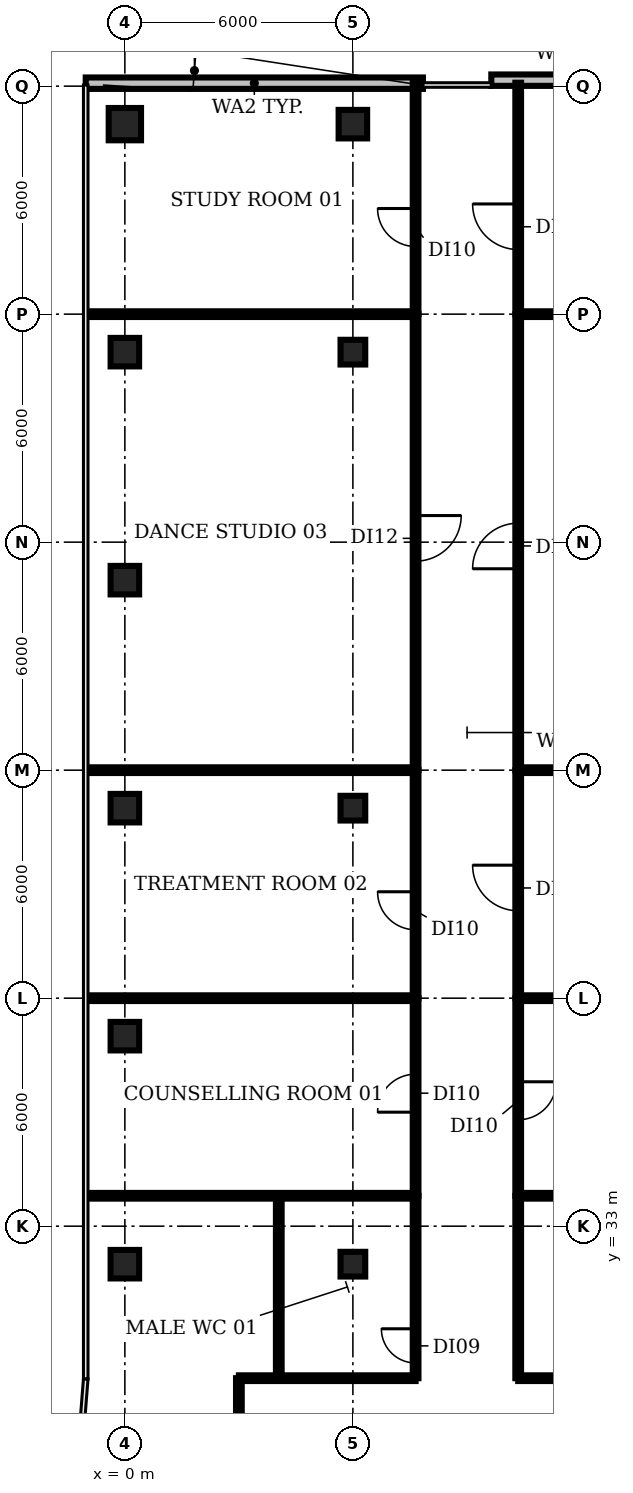
"""IFC4 building model, lengths in metres.
Left out: names, types, materials, properties, quantities, classifications, styles, units other than length and angle.
Written with IfcOpenShell. Run it as: python <this file> out.ifc"""

import sys

from ifc_helpers import new_model, si_unit, direction, frame, frame_2d, origin, origin_2d, place, context, subcontext, project, spatial, rectangle, circle, extrude, element, fill, save


model = new_model("IFC4")
c1 = context("Model", 3, precision=1e-05, world=origin(), true_north=direction((0.0, 1.0)))
c2 = subcontext(c1, "Body", "Model", "MODEL_VIEW")
j1 = project(units=[si_unit("LENGTHUNIT", "METRE"), si_unit("PLANEANGLEUNIT", "RADIAN")], contexts=[c1])
p1 = place(None, origin())
s1 = spatial("IfcSite", under=j1, at=p1, CompositionType="ELEMENT")
p2 = place(p1, origin())
s2 = spatial("IfcBuilding", under=s1, at=p2, CompositionType="ELEMENT")
p3 = place(p2, frame((0.0, 0.0, 268.4)))
s3 = spatial("IfcBuildingStorey", under=s2, at=p3, CompositionType="ELEMENT", Elevation=268.4)
for number, where, z_axis, x_axis in (
    (1, (0.0, 32.0, 0.0), (0.0, 0.0, 1.0), (1.0, 0.0, 0.0)),
    (2, (0.0, 38.0, 0.0), (0.0, 0.0, 1.0), (1.0, 0.0, 0.0)),
    (3, (0.0, 44.0, 0.0), (0.0, 0.0, 1.0), (1.0, 0.0, 0.0)),
    (4, (0.0, 50.0, 0.0), (0.0, 0.0, 1.0), (1.0, 0.0, 0.0)),
    (5, (0.0, 56.0, 0.0), (0.0, 0.0, 1.0), (1.0, 0.0, 0.0)),
):
    element("IfcColumn", number, at=place(p3, frame(where, z_axis=z_axis, x_axis=x_axis)), inside=s3, PredefinedType="COLUMN", context=c2, shape_type="SweptSolid", body=[
        extrude(rectangle(XDim=0.75, YDim=0.75, at=origin_2d()), origin(), (0.0, 0.0, 1.0), 3.8),
    ])
p4 = place(p3, frame((0.0, 62.0, 0.0), z_axis=(0.0, 0.0, 1.0), x_axis=(1.0, 0.0, 0.0)))
e6 = element("IfcColumn", 6, at=p4, inside=s3, PredefinedType="COLUMN", context=c2, shape_type="SweptSolid", body=[
    extrude(circle(Radius=0.425, at=origin_2d()), origin(), (0.0, 0.0, 1.0), 3.8),
])
for number, where, z_axis, x_axis in (
    (7, (6.0, 32.0, 0.0), (0.0, 0.0, 1.0), (1.0, 0.0, 0.0)),
    (8, (6.0, 44.0, 0.0), (0.0, 0.0, 1.0), (1.0, 0.0, 0.0)),
    (9, (6.0, 56.0, 0.0), (0.0, 0.0, 1.0), (1.0, 0.0, 0.0)),
):
    element("IfcColumn", number, at=place(p3, frame(where, z_axis=z_axis, x_axis=x_axis)), inside=s3, PredefinedType="COLUMN", context=c2, shape_type="SweptSolid", body=[
        extrude(rectangle(XDim=0.65, YDim=0.65, at=origin_2d()), origin(), (0.0, 0.0, 1.0), 3.8),
    ])
p5 = place(p3, frame((6.0, 62.0, 0.0), z_axis=(0.0, 0.0, 1.0), x_axis=(1.0, 0.0, 0.0)))
e10 = element("IfcColumn", 10, at=p5, inside=s3, PredefinedType="COLUMN", context=c2, shape_type="SweptSolid", body=[
    extrude(rectangle(XDim=0.75, YDim=0.75, at=origin_2d()), origin(), (0.0, 0.0, 1.0), 3.8),
])
p6 = place(p3, frame((14.357, 63.157, 0.0), z_axis=(0.0, 0.0, 1.0), x_axis=(-1.0, 0.0, 0.0)))
e11 = element("IfcWall", 11, at=p6, inside=s3, PredefinedType="SOLIDWALL", context=c2, shape_type="SweptSolid", body=[
    extrude(rectangle(XDim=4.715, YDim=0.3, at=frame_2d((2.357, 0.0))), origin(), (0.0, 0.0, 1.0), 3.8),
])
p7 = place(p3, frame((7.843, 63.078, 0.0), z_axis=(0.0, 0.0, 1.0), x_axis=(-1.0, 0.0, 0.0)))
e12 = element("IfcWall", 12, at=p7, inside=s3, PredefinedType="SOLIDWALL", context=c2, shape_type="SweptSolid", body=[
    extrude(rectangle(XDim=8.873, YDim=0.3, at=frame_2d((4.436, 0.0))), origin(), (0.0, 0.0, 1.0), 3.8),
])
for number, where, z_axis, x_axis in (
    (13, (-0.98, 33.8, 0.0), (0.0, 0.0, 1.0), (1.0, 0.0, 0.0)),
    (14, (-0.98, 39.0, 0.0), (0.0, 0.0, 1.0), (1.0, 0.0, 0.0)),
    (15, (-0.98, 45.0, 0.0), (0.0, 0.0, 1.0), (1.0, 0.0, 0.0)),
    (16, (-0.98, 57.0, 0.0), (0.0, 0.0, 1.0), (1.0, 0.0, 0.0)),
):
    element("IfcWall", number, at=place(p3, frame(where, z_axis=z_axis, x_axis=x_axis)), inside=s3, PredefinedType="PARTITIONING", context=c2, shape_type="SweptSolid", body=[
        extrude(rectangle(XDim=8.63, YDim=0.15, at=frame_2d((4.315, 0.0))), origin(), (0.0, 0.0, 1.0), 2.85),
    ])
p8 = place(p3, frame((3.0, 25.1, 0.0), z_axis=(0.0, 0.0, 1.0), x_axis=(0.0, 1.0, 0.0)))
e17 = element("IfcWall", 17, at=p8, inside=s3, PredefinedType="PARTITIONING", context=c2, shape_type="SweptSolid", body=[
    extrude(rectangle(XDim=3.9, YDim=0.15, at=frame_2d((1.95, 0.0))), origin(), (0.0, 0.0, 1.0), 2.85),
])
p9 = place(p3, frame((3.0, 29.0, 0.0), z_axis=(0.0, 0.0, 1.0), x_axis=(1.0, 0.0, 0.0)))
e18 = element("IfcWall", 18, at=p9, inside=s3, PredefinedType="PARTITIONING", context=c2, shape_type="SweptSolid", body=[
    extrude(rectangle(XDim=4.65, YDim=0.15, at=frame_2d((2.325, 0.0))), origin(), (0.0, 0.0, 1.0), 2.85),
])
p10 = place(p3, frame((4.05, 29.0, 0.0), z_axis=(0.0, 0.0, 1.0), x_axis=(0.0, 1.0, 0.0)))
e19 = element("IfcWall", 19, at=p10, inside=s3, PredefinedType="PARTITIONING", context=c2, shape_type="SweptSolid", body=[
    extrude(rectangle(XDim=4.8, YDim=0.15, at=frame_2d((2.4, 0.0))), origin(), (0.0, 0.0, 1.0), 2.85),
])
p11 = place(p3, frame((7.65, 29.0, 0.0), z_axis=(0.0, 0.0, 1.0), x_axis=(0.0, 1.0, 0.0)))
e20 = element("IfcWall", 20, at=p11, inside=s3, PredefinedType="PARTITIONING", context=c2, shape_type="SweptSolid", body=[
    extrude(rectangle(XDim=4.8, YDim=0.15, at=frame_2d((2.4, 0.0))), origin(), (0.0, 0.0, 1.0), 2.85),
])
p12 = place(p11, frame((0.4, 0.0, 0.0)))
e21 = element("IfcOpeningElement", 21, at=p12, cuts=e20, PredefinedType="OPENING", context=c2, shape_type="SweptSolid", body=[
    extrude(rectangle(XDim=0.9, YDim=2.1, at=frame_2d((0.45, 1.05))), frame((0.0, 0.085, 0.0), z_axis=(0.0, -1.0, 0.0), x_axis=(1.0, 0.0, 0.0)), (0.0, 0.0, 1.0), 0.17),
])
p13 = place(p3, frame((7.65, 33.8, 0.0), z_axis=(0.0, 0.0, 1.0), x_axis=(0.0, 1.0, 0.0)))
e22 = element("IfcWall", 22, at=p13, inside=s3, PredefinedType="PARTITIONING", context=c2, shape_type="SweptSolid", body=[
    extrude(rectangle(XDim=5.2, YDim=0.15, at=frame_2d((2.6, 0.0))), origin(), (0.0, 0.0, 1.0), 2.85),
])
p14 = place(p13, frame((2.2, 0.0, 0.0)))
e23 = element("IfcOpeningElement", 23, at=p14, cuts=e22, PredefinedType="OPENING", context=c2, shape_type="SweptSolid", body=[
    extrude(rectangle(XDim=1.0, YDim=2.1, at=frame_2d((0.5, 1.05))), frame((0.0, 0.085, 0.0), z_axis=(0.0, -1.0, 0.0), x_axis=(1.0, 0.0, 0.0)), (0.0, 0.0, 1.0), 0.17),
])
p15 = place(p3, frame((7.65, 39.0, 0.0), z_axis=(0.0, 0.0, 1.0), x_axis=(0.0, 1.0, 0.0)))
e24 = element("IfcWall", 24, at=p15, inside=s3, PredefinedType="PARTITIONING", context=c2, shape_type="SweptSolid", body=[
    extrude(rectangle(XDim=6.0, YDim=0.15, at=frame_2d((3.0, 0.0))), origin(), (0.0, 0.0, 1.0), 2.85),
])
p16 = place(p15, frame((1.8, 0.0, 0.0)))
e25 = element("IfcOpeningElement", 25, at=p16, cuts=e24, PredefinedType="OPENING", context=c2, shape_type="SweptSolid", body=[
    extrude(rectangle(XDim=1.0, YDim=2.1, at=frame_2d((0.5, 1.05))), frame((0.0, 0.085, 0.0), z_axis=(0.0, -1.0, 0.0), x_axis=(1.0, 0.0, 0.0)), (0.0, 0.0, 1.0), 0.17),
])
p17 = place(p3, frame((7.65, 57.0, 0.0), z_axis=(0.0, 0.0, 1.0), x_axis=(0.0, -1.0, 0.0)))
e26 = element("IfcWall", 26, at=p17, inside=s3, PredefinedType="PARTITIONING", context=c2, shape_type="SweptSolid", body=[
    extrude(rectangle(XDim=12.0, YDim=0.15, at=frame_2d((6.0, 0.0))), origin(), (0.0, 0.0, 1.0), 2.85),
])
p18 = place(p17, frame((5.3, 0.0, 0.0)))
e27 = element("IfcOpeningElement", 27, at=p18, cuts=e26, PredefinedType="OPENING", context=c2, shape_type="SweptSolid", body=[
    extrude(rectangle(XDim=1.2, YDim=2.1, at=frame_2d((0.6, 1.05))), frame((0.0, 0.085, 0.0), z_axis=(0.0, -1.0, 0.0), x_axis=(1.0, 0.0, 0.0)), (0.0, 0.0, 1.0), 0.17),
])
p19 = place(p3, frame((7.65, 57.0, 0.0), z_axis=(0.0, 0.0, 1.0), x_axis=(0.0, 1.0, 0.0)))
e28 = element("IfcWall", 28, at=p19, inside=s3, PredefinedType="PARTITIONING", context=c2, shape_type="SweptSolid", body=[
    extrude(rectangle(XDim=6.09, YDim=0.15, at=frame_2d((3.045, 0.0))), origin(), (0.0, 0.0, 1.0), 2.85),
])
p20 = place(p19, frame((1.78, 0.0, 0.0)))
e29 = element("IfcOpeningElement", 29, at=p20, cuts=e28, PredefinedType="OPENING", context=c2, shape_type="SweptSolid", body=[
    extrude(rectangle(XDim=1.0, YDim=2.1, at=frame_2d((0.5, 1.05))), frame((0.0, 0.085, 0.0), z_axis=(0.0, -1.0, 0.0), x_axis=(1.0, 0.0, 0.0)), (0.0, 0.0, 1.0), 0.17),
])
p21 = place(p3, frame((10.35, 29.0, 0.0), z_axis=(0.0, 0.0, 1.0), x_axis=(0.0, 1.0, 0.0)))
e30 = element("IfcWall", 30, at=p21, inside=s3, PredefinedType="PARTITIONING", context=c2, shape_type="SweptSolid", body=[
    extrude(rectangle(XDim=4.8, YDim=0.15, at=frame_2d((2.4, 0.0))), origin(), (0.0, 0.0, 1.0), 2.85),
])
p22 = place(p3, frame((10.35, 29.0, 0.0), z_axis=(0.0, 0.0, 1.0), x_axis=(1.0, 0.0, 0.0)))
e31 = element("IfcWall", 31, at=p22, inside=s3, PredefinedType="PARTITIONING", context=c2, shape_type="SweptSolid", body=[
    extrude(rectangle(XDim=4.05, YDim=0.15, at=frame_2d((2.025, 0.0))), origin(), (0.0, 0.0, 1.0), 2.85),
])
p23 = place(p3, frame((10.35, 33.8, 0.0), z_axis=(0.0, 0.0, 1.0), x_axis=(1.0, 0.0, 0.0)))
e32 = element("IfcWall", 32, at=p23, inside=s3, PredefinedType="PARTITIONING", context=c2, shape_type="SweptSolid", body=[
    extrude(rectangle(XDim=11.49, YDim=0.15, at=frame_2d((5.745, 0.0))), origin(), (0.0, 0.0, 1.0), 2.85),
])
p24 = place(p3, frame((10.35, 39.0, 0.0), z_axis=(0.0, 0.0, 1.0), x_axis=(0.0, -1.0, 0.0)))
e33 = element("IfcWall", 33, at=p24, inside=s3, PredefinedType="PARTITIONING", context=c2, shape_type="SweptSolid", body=[
    extrude(rectangle(XDim=5.2, YDim=0.15, at=frame_2d((2.6, 0.0))), origin(), (0.0, 0.0, 1.0), 2.85),
])
p25 = place(p24, frame((2.2, 0.0, 0.0)))
e34 = element("IfcOpeningElement", 34, at=p25, cuts=e33, PredefinedType="OPENING", context=c2, shape_type="SweptSolid", body=[
    extrude(rectangle(XDim=1.0, YDim=2.1, at=frame_2d((0.5, 1.05))), frame((0.0, 0.085, 0.0), z_axis=(0.0, -1.0, 0.0), x_axis=(1.0, 0.0, 0.0)), (0.0, 0.0, 1.0), 0.17),
])
p26 = place(p3, frame((10.35, 39.0, 0.0), z_axis=(0.0, 0.0, 1.0), x_axis=(0.0, 1.0, 0.0)))
e35 = element("IfcWall", 35, at=p26, inside=s3, PredefinedType="PARTITIONING", context=c2, shape_type="SweptSolid", body=[
    extrude(rectangle(XDim=6.0, YDim=0.15, at=frame_2d((3.0, 0.0))), origin(), (0.0, 0.0, 1.0), 2.85),
])
p27 = place(p26, frame((2.3, 0.0, 0.0)))
e36 = element("IfcOpeningElement", 36, at=p27, cuts=e35, PredefinedType="OPENING", context=c2, shape_type="SweptSolid", body=[
    extrude(rectangle(XDim=1.2, YDim=2.1, at=frame_2d((0.6, 1.05))), frame((0.0, 0.085, 0.0), z_axis=(0.0, -1.0, 0.0), x_axis=(1.0, 0.0, 0.0)), (0.0, 0.0, 1.0), 0.17),
])
p28 = place(p3, frame((10.35, 39.0, 0.0), z_axis=(0.0, 0.0, 1.0), x_axis=(1.0, 0.0, 0.0)))
e37 = element("IfcWall", 37, at=p28, inside=s3, PredefinedType="PARTITIONING", context=c2, shape_type="SweptSolid", body=[
    extrude(rectangle(XDim=15.5, YDim=0.15, at=frame_2d((7.75, 0.0))), origin(), (0.0, 0.0, 1.0), 2.85),
])
p29 = place(p3, frame((10.35, 45.0, 0.0), z_axis=(0.0, 0.0, 1.0), x_axis=(0.0, 1.0, 0.0)))
e38 = element("IfcWall", 38, at=p29, inside=s3, PredefinedType="PARTITIONING", context=c2, shape_type="SweptSolid", body=[
    extrude(rectangle(XDim=12.0, YDim=0.15, at=frame_2d((6.0, 0.0))), origin(), (0.0, 0.0, 1.0), 2.85),
])
p30 = place(p29, frame((5.3, 0.0, 0.0)))
e39 = element("IfcOpeningElement", 39, at=p30, cuts=e38, PredefinedType="OPENING", context=c2, shape_type="SweptSolid", body=[
    extrude(rectangle(XDim=1.2, YDim=2.1, at=frame_2d((0.6, 1.05))), frame((0.0, 0.085, 0.0), z_axis=(0.0, -1.0, 0.0), x_axis=(1.0, 0.0, 0.0)), (0.0, 0.0, 1.0), 0.17),
])
p31 = place(p3, frame((10.35, 45.0, 0.0), z_axis=(0.0, 0.0, 1.0), x_axis=(1.0, 0.0, 0.0)))
e40 = element("IfcWall", 40, at=p31, inside=s3, PredefinedType="PARTITIONING", context=c2, shape_type="SweptSolid", body=[
    extrude(rectangle(XDim=15.957, YDim=0.15, at=frame_2d((7.979, 0.0))), origin(), (0.0, 0.0, 1.0), 2.85),
])
p32 = place(p3, frame((10.35, 57.0, 0.0), z_axis=(0.0, 0.0, 1.0), x_axis=(0.0, 1.0, 0.0)))
e41 = element("IfcWall", 41, at=p32, inside=s3, PredefinedType="PARTITIONING", context=c2, shape_type="SweptSolid", body=[
    extrude(rectangle(XDim=6.09, YDim=0.15, at=frame_2d((3.045, 0.0))), origin(), (0.0, 0.0, 1.0), 2.85),
])
p33 = place(p32, frame((1.7, 0.0, 0.0)))
e42 = element("IfcOpeningElement", 42, at=p33, cuts=e41, PredefinedType="OPENING", context=c2, shape_type="SweptSolid", body=[
    extrude(rectangle(XDim=1.2, YDim=2.1, at=frame_2d((0.6, 1.05))), frame((0.0, 0.085, 0.0), z_axis=(0.0, -1.0, 0.0), x_axis=(1.0, 0.0, 0.0)), (0.0, 0.0, 1.0), 0.17),
])
p34 = place(p3, frame((10.35, 57.0, 0.0), z_axis=(0.0, 0.0, 1.0), x_axis=(1.0, 0.0, 0.0)))
e43 = element("IfcWall", 43, at=p34, inside=s3, PredefinedType="PARTITIONING", context=c2, shape_type="SweptSolid", body=[
    extrude(rectangle(XDim=16.906, YDim=0.15, at=frame_2d((8.453, 0.0))), origin(), (0.0, 0.0, 1.0), 2.85),
])
p35 = place(p12, origin())
e44 = element("IfcDoor", 44, at=p35, inside=s3, OperationType="SINGLE_SWING_RIGHT", PredefinedType="DOOR", context=c2, shape_type="SweptSolid", body=[
    extrude(rectangle(XDim=0.9, YDim=2.1, at=frame_2d((0.45, 1.05))), frame((0.0, 0.025, 0.0), z_axis=(0.0, -1.0, 0.0), x_axis=(1.0, 0.0, 0.0)), (0.0, 0.0, 1.0), 0.05),
])
fill(e21, e44)
p36 = place(p14, origin())
e45 = element("IfcDoor", 45, at=p36, inside=s3, OperationType="SINGLE_SWING_LEFT", PredefinedType="DOOR", context=c2, shape_type="SweptSolid", body=[
    extrude(rectangle(XDim=1.0, YDim=2.1, at=frame_2d((0.5, 1.05))), frame((0.0, 0.025, 0.0), z_axis=(0.0, -1.0, 0.0), x_axis=(1.0, 0.0, 0.0)), (0.0, 0.0, 1.0), 0.05),
])
fill(e23, e45)
p37 = place(p16, origin())
e46 = element("IfcDoor", 46, at=p37, inside=s3, OperationType="SINGLE_SWING_RIGHT", PredefinedType="DOOR", context=c2, shape_type="SweptSolid", body=[
    extrude(rectangle(XDim=1.0, YDim=2.1, at=frame_2d((0.5, 1.05))), frame((0.0, 0.025, 0.0), z_axis=(0.0, -1.0, 0.0), x_axis=(1.0, 0.0, 0.0)), (0.0, 0.0, 1.0), 0.05),
])
fill(e25, e46)
p38 = place(p18, origin())
e47 = element("IfcDoor", 47, at=p38, inside=s3, OperationType="SINGLE_SWING_LEFT", PredefinedType="DOOR", context=c2, shape_type="SweptSolid", body=[
    extrude(rectangle(XDim=1.2, YDim=2.1, at=frame_2d((0.6, 1.05))), frame((0.0, 0.025, 0.0), z_axis=(0.0, -1.0, 0.0), x_axis=(1.0, 0.0, 0.0)), (0.0, 0.0, 1.0), 0.05),
])
fill(e27, e47)
p39 = place(p20, origin())
e48 = element("IfcDoor", 48, at=p39, inside=s3, OperationType="SINGLE_SWING_RIGHT", PredefinedType="DOOR", context=c2, shape_type="SweptSolid", body=[
    extrude(rectangle(XDim=1.0, YDim=2.1, at=frame_2d((0.5, 1.05))), frame((0.0, 0.025, 0.0), z_axis=(0.0, -1.0, 0.0), x_axis=(1.0, 0.0, 0.0)), (0.0, 0.0, 1.0), 0.05),
])
fill(e29, e48)
p40 = place(p25, origin())
e49 = element("IfcDoor", 49, at=p40, inside=s3, OperationType="SINGLE_SWING_LEFT", PredefinedType="DOOR", context=c2, shape_type="SweptSolid", body=[
    extrude(rectangle(XDim=1.0, YDim=2.1, at=frame_2d((0.5, 1.05))), frame((0.0, 0.025, 0.0), z_axis=(0.0, -1.0, 0.0), x_axis=(1.0, 0.0, 0.0)), (0.0, 0.0, 1.0), 0.05),
])
fill(e34, e49)
p41 = place(p27, origin())
e50 = element("IfcDoor", 50, at=p41, inside=s3, OperationType="SINGLE_SWING_RIGHT", PredefinedType="DOOR", context=c2, shape_type="SweptSolid", body=[
    extrude(rectangle(XDim=1.2, YDim=2.1, at=frame_2d((0.6, 1.05))), frame((0.0, 0.025, 0.0), z_axis=(0.0, -1.0, 0.0), x_axis=(1.0, 0.0, 0.0)), (0.0, 0.0, 1.0), 0.05),
])
fill(e36, e50)
p42 = place(p30, origin())
e51 = element("IfcDoor", 51, at=p42, inside=s3, OperationType="SINGLE_SWING_LEFT", PredefinedType="DOOR", context=c2, shape_type="SweptSolid", body=[
    extrude(rectangle(XDim=1.2, YDim=2.1, at=frame_2d((0.6, 1.05))), frame((0.0, 0.025, 0.0), z_axis=(0.0, -1.0, 0.0), x_axis=(1.0, 0.0, 0.0)), (0.0, 0.0, 1.0), 0.05),
])
fill(e39, e51)
p43 = place(p33, origin())
e52 = element("IfcDoor", 52, at=p43, inside=s3, OperationType="SINGLE_SWING_RIGHT", PredefinedType="DOOR", context=c2, shape_type="SweptSolid", body=[
    extrude(rectangle(XDim=1.2, YDim=2.1, at=frame_2d((0.6, 1.05))), frame((0.0, 0.025, 0.0), z_axis=(0.0, -1.0, 0.0), x_axis=(1.0, 0.0, 0.0)), (0.0, 0.0, 1.0), 0.05),
])
fill(e42, e52)
save(model, sys.argv[1])
